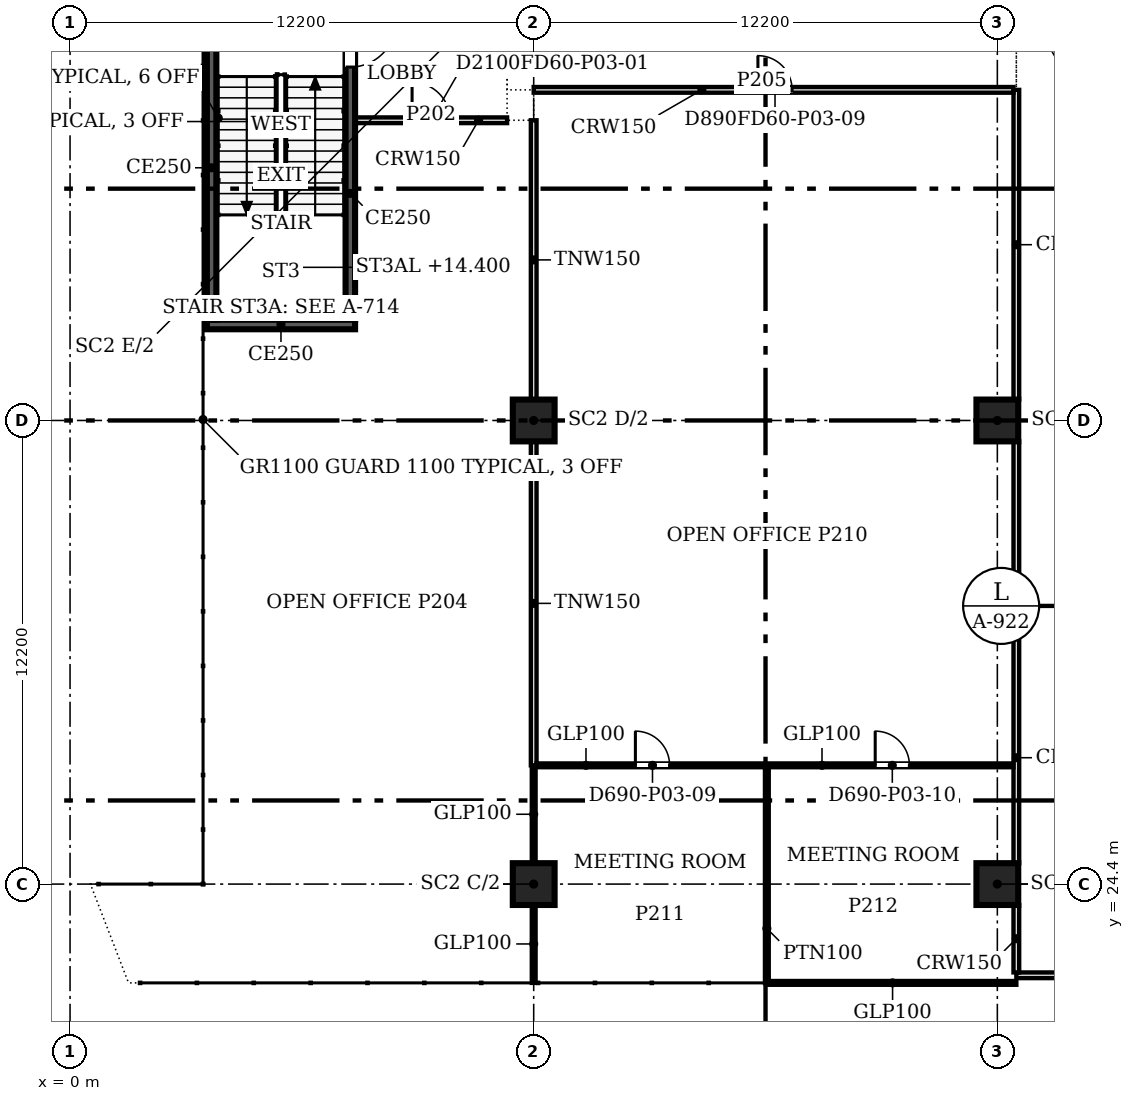
"""IFC4 building model, lengths in metres.
Left out: names, types, materials, properties, quantities, classifications, styles, units other than length and angle.
Written with IfcOpenShell. Run it as: python <this file> out.ifc"""

import sys

from ifc_helpers import new_model, si_unit, direction, frame, frame_2d, origin, origin_2d, place, context, subcontext, project, spatial, polyline, rectangle, outline, extrude, faceted_brep, source, transform, mapped, element, fill, save


model = new_model("IFC4")
c1 = context("Model", 3, precision=1e-05, world=origin(), true_north=direction((0.0, 1.0)))
c2 = subcontext(c1, "Body", "Model", "MODEL_VIEW")
j1 = project(units=[si_unit("LENGTHUNIT", "METRE"), si_unit("PLANEANGLEUNIT", "RADIAN")], contexts=[c1])
p1 = place(None, origin())
s1 = spatial("IfcSite", under=j1, at=p1, CompositionType="ELEMENT")
p2 = place(p1, origin())
s2 = spatial("IfcBuilding", under=s1, at=p2, CompositionType="ELEMENT")
p3 = place(p2, frame((0.0, 0.0, 12.0)))
s3 = spatial("IfcBuildingStorey", under=s2, at=p3, CompositionType="ELEMENT", Elevation=12.0)
for number, where, z_axis, x_axis in (
    (1, (12.2, 24.4, 0.0), (0.0, 0.0, 1.0), (1.0, 0.0, 0.0)),
    (2, (12.2, 36.6, 0.0), (0.0, 0.0, 1.0), (1.0, 0.0, 0.0)),
    (3, (24.4, 24.4, 0.0), (0.0, 0.0, 1.0), (1.0, 0.0, 0.0)),
    (4, (24.4, 36.6, 0.0), (0.0, 0.0, 1.0), (1.0, 0.0, 0.0)),
):
    element("IfcColumn", number, at=place(p3, frame(where, z_axis=z_axis, x_axis=x_axis)), inside=s3, PredefinedType="COLUMN", context=c2, shape_type="SweptSolid", body=[
        extrude(rectangle(XDim=1.1, YDim=1.1, at=origin_2d()), origin(), (0.0, 0.0, 1.0), 4.6),
    ])
m1 = source(origin(), c2, "Body", "Brep", [
    faceted_brep([(0.047, -0.25, 0.0), (6.1, -0.25, 8.4), (0.0, -0.25, 8.4), (0.0, -0.25, 0.066), (0.093, 0.25, 8.4), (6.1, 0.25, 8.4), (0.093, 0.25, 0.065), (0.047, 0.0, 0.0)], [[[0, 1, 2, 3]], [[4, 5, 6]], [[6, 5, 1, 0, 7]], [[5, 4, 2, 1]], [[7, 0, 3]], [[6, 7, 3, 2, 4]]]),
])
p4 = place(p3, frame((0.25, 48.8, -3.6), z_axis=(0.0, 0.0, 1.0), x_axis=(0.0, -1.0, 0.0)))
e5 = element("IfcWall", 5, at=p4, inside=s3, PredefinedType="SOLIDWALL", context=c2, shape_type="MappedRepresentation", body=[
    mapped(m1, transform((0.0, 0.0, 0.0), scale=1.0)),
])
m2 = source(origin(), c2, "Body", "SweptSolid", [
    extrude(outline(polyline([(0.247, 0.705), (5.612, 8.15), (0.247, 8.15), (0.247, 0.705)])), frame((0.0, 0.26, 0.0), z_axis=(0.0, -1.0, 0.0), x_axis=(1.0, 0.0, 0.0)), (0.0, 0.0, 1.0), 0.52),
])
p5 = place(p4, origin())
e6 = element("IfcOpeningElement", 6, at=p5, cuts=e5, PredefinedType="OPENING", context=c2, shape_type="MappedRepresentation", body=[
    mapped(m2, transform((0.0, 0.0, 0.0), scale=1.0)),
])
m3 = source(origin(), c2, "Body", "SweptSolid", [
    extrude(outline(polyline([(6.1, 0.0), (12.2, 8.4), (0.0, 8.4), (6.1, 0.0)])), frame((0.0, 0.25, 0.0), z_axis=(0.0, -1.0, 0.0), x_axis=(1.0, 0.0, 0.0)), (0.0, 0.0, 1.0), 0.5),
])
p6 = place(p3, frame((0.25, 42.7, -3.6), z_axis=(0.0, 0.0, 1.0), x_axis=(0.0, -1.0, 0.0)))
e7 = element("IfcWall", 7, at=p6, inside=s3, PredefinedType="SOLIDWALL", context=c2, shape_type="MappedRepresentation", body=[
    mapped(m3, transform((0.0, 0.0, 0.0), scale=1.0)),
])
m4 = source(origin(), c2, "Body", "SweptSolid", [
    extrude(outline(polyline([(6.1, 0.426), (11.709, 8.15), (0.49, 8.15), (6.1, 0.426)])), frame((0.0, 0.26, 0.0), z_axis=(0.0, -1.0, 0.0), x_axis=(1.0, 0.0, 0.0)), (0.0, 0.0, 1.0), 0.52),
])
p7 = place(p6, origin())
e8 = element("IfcOpeningElement", 8, at=p7, cuts=e7, PredefinedType="OPENING", context=c2, shape_type="MappedRepresentation", body=[
    mapped(m4, transform((0.0, 0.0, 0.0), scale=1.0)),
])
m5 = source(origin(), c2, "Body", "Brep", [
    faceted_brep([(6.053, -0.25, 0.0), (6.1, -0.25, 0.066), (6.1, -0.25, 8.4), (0.0, -0.25, 8.4), (0.0, 0.25, 8.4), (6.007, 0.25, 8.4), (6.007, 0.25, 0.065), (6.053, 0.0, 0.0)], [[[0, 1, 2, 3]], [[4, 5, 6]], [[1, 0, 7]], [[5, 4, 3, 2]], [[4, 6, 7, 0, 3]], [[1, 7, 6, 5, 2]]]),
])
p8 = place(p3, frame((0.25, 30.5, -3.6), z_axis=(0.0, 0.0, 1.0), x_axis=(0.0, -1.0, 0.0)))
e9 = element("IfcWall", 9, at=p8, inside=s3, PredefinedType="SOLIDWALL", context=c2, shape_type="MappedRepresentation", body=[
    mapped(m5, transform((0.0, 0.0, 0.0), scale=1.0)),
])
m6 = source(origin(), c2, "Body", "SweptSolid", [
    extrude(outline(polyline([(5.854, 8.15), (0.488, 8.15), (5.854, 0.705), (5.854, 8.15)])), frame((0.0, 0.26, 0.0), z_axis=(0.0, -1.0, 0.0), x_axis=(1.0, 0.0, 0.0)), (0.0, 0.0, 1.0), 0.52),
])
p9 = place(p8, origin())
e10 = element("IfcOpeningElement", 10, at=p9, cuts=e9, PredefinedType="OPENING", context=c2, shape_type="MappedRepresentation", body=[
    mapped(m6, transform((0.0, 0.0, 0.0), scale=1.0)),
])
m7 = source(origin(), c2, "Body", "Brep", [
    faceted_brep([(6.1, -0.25, 0.0), (0.0, -0.25, 8.4), (0.0, -0.25, 7.549), (5.482, -0.25, 0.0), (6.1, -0.25, 0.0), (5.482, 0.25, 0.0), (0.0, 0.25, 7.549), (0.0, 0.25, 8.4), (6.1, 0.25, 0.0), (6.1, 0.25, 0.0)], [[[0, 1, 2, 3, 4]], [[5, 6, 7, 8, 9]], [[8, 7, 1, 0]], [[7, 6, 2, 1]], [[6, 5, 3, 2]], [[5, 9, 4, 3]], [[4, 9, 8, 0]]]),
])
p10 = place(p3, frame((0.25, 42.7, -3.6), z_axis=(0.0, 0.0, 1.0), x_axis=(0.0, -1.0, 0.0)))
e11 = element("IfcWall", 11, at=p10, inside=s3, PredefinedType="SOLIDWALL", context=c2, shape_type="MappedRepresentation", body=[
    mapped(m7, transform((0.0, 0.0, 0.0), scale=1.0)),
])
m8 = source(origin(), c2, "Body", "Brep", [
    faceted_brep([(6.053, -0.25, 8.4), (0.0, -0.25, 0.0), (0.613, -0.25, 0.0), (6.053, -0.25, 7.549), (6.053, 0.25, 7.549), (0.613, 0.25, 0.0), (0.047, 0.25, 0.0), (0.047, 0.25, 0.065), (6.053, 0.25, 8.4), (0.0, 0.0, 0.0)], [[[0, 1, 2, 3]], [[4, 5, 6, 7, 8]], [[8, 7, 9, 1, 0]], [[6, 5, 2, 1, 9]], [[5, 4, 3, 2]], [[6, 9, 7]], [[3, 4, 8, 0]]]),
])
p11 = place(p3, frame((0.25, 48.753, -3.6), z_axis=(0.0, 0.0, 1.0), x_axis=(0.0, -1.0, 0.0)))
e12 = element("IfcWall", 12, at=p11, inside=s3, PredefinedType="SOLIDWALL", context=c2, shape_type="MappedRepresentation", body=[
    mapped(m8, transform((0.0, 0.0, 0.0), scale=1.0)),
])
m9 = source(origin(), c2, "Body", "Brep", [
    faceted_brep([(6.053, -0.25, 0.0), (0.0, -0.25, 8.4), (0.0, -0.25, 7.549), (5.44, -0.25, 0.0), (5.44, 0.25, 0.0), (0.0, 0.25, 7.549), (0.0, 0.25, 8.4), (6.007, 0.25, 0.065), (6.007, 0.25, 0.0), (6.053, 0.0, 0.0)], [[[0, 1, 2, 3]], [[4, 5, 6, 7, 8]], [[7, 6, 1, 0, 9]], [[6, 5, 2, 1]], [[5, 4, 3, 2]], [[4, 8, 9, 0, 3]], [[9, 8, 7]]]),
])
p12 = place(p3, frame((0.25, 30.5, -3.6), z_axis=(0.0, 0.0, 1.0), x_axis=(0.0, -1.0, 0.0)))
e13 = element("IfcWall", 13, at=p12, inside=s3, PredefinedType="SOLIDWALL", context=c2, shape_type="MappedRepresentation", body=[
    mapped(m9, transform((0.0, 0.0, 0.0), scale=1.0)),
])
m10 = source(origin(), c2, "Body", "SweptSolid", [
    extrude(outline(polyline([(6.1, 8.4), (0.0, 0.0), (0.618, 0.0), (6.1, 7.549), (6.1, 8.4)])), frame((0.0, 0.25, 0.0), z_axis=(0.0, -1.0, 0.0), x_axis=(1.0, 0.0, 0.0)), (0.0, 0.0, 1.0), 0.5),
])
p13 = place(p3, frame((0.25, 36.6, -3.6), z_axis=(0.0, 0.0, 1.0), x_axis=(0.0, -1.0, 0.0)))
e14 = element("IfcWall", 14, at=p13, inside=s3, PredefinedType="SOLIDWALL", context=c2, shape_type="MappedRepresentation", body=[
    mapped(m10, transform((0.0, 0.0, 0.0), scale=1.0)),
])
p14 = place(p3, frame((7.5, 39.125, 0.0), z_axis=(0.0, 0.0, 1.0), x_axis=(-1.0, 0.0, 0.0)))
e15 = element("IfcWall", 15, at=p14, inside=s3, PredefinedType="SOLIDWALL", context=c2, shape_type="SweptSolid", body=[
    extrude(rectangle(XDim=3.9, YDim=0.25, at=frame_2d((1.95, 0.0))), origin(), (0.0, 0.0, 1.0), 4.8),
])
p15 = place(p3, frame((3.725, 39.25, 0.0), z_axis=(0.0, 0.0, 1.0), x_axis=(0.0, 1.0, 0.0)))
e16 = element("IfcWall", 16, at=p15, inside=s3, PredefinedType="SOLIDWALL", context=c2, shape_type="SweptSolid", body=[
    extrude(rectangle(XDim=8.0, YDim=0.25, at=frame_2d((4.0, 0.0))), origin(), (0.0, 0.0, 1.0), 4.8),
])
p16 = place(p3, frame((7.375, 47.25, 0.0), z_axis=(0.0, 0.0, 1.0), x_axis=(0.0, -1.0, 0.0)))
e17 = element("IfcWall", 17, at=p16, inside=s3, PredefinedType="SOLIDWALL", context=c2, shape_type="SweptSolid", body=[
    extrude(rectangle(XDim=8.0, YDim=0.25, at=frame_2d((4.0, 0.0))), origin(), (0.0, 0.0, 1.0), 4.8),
])
m11 = source(origin(), c2, "Body", "SweptSolid", [
    extrude(rectangle(XDim=1.2, YDim=2.1, at=frame_2d((0.6, 1.05))), frame((0.0, 0.135, 0.0), z_axis=(0.0, -1.0, 0.0), x_axis=(1.0, 0.0, 0.0)), (0.0, 0.0, 1.0), 0.27),
])
p17 = place(p16, frame((0.15, 0.0, 0.0)))
e18 = element("IfcOpeningElement", 18, at=p17, cuts=e17, PredefinedType="OPENING", context=c2, shape_type="MappedRepresentation", body=[
    mapped(m11, transform((0.0, 0.0, 0.0), scale=1.0)),
])
p18 = place(p3, frame((12.2, 21.8, 0.0), z_axis=(0.0, 0.0, 1.0), x_axis=(0.0, 1.0, 0.0)))
e19 = element("IfcWall", 19, at=p18, inside=s3, PredefinedType="PARTITIONING", context=c2, shape_type="SweptSolid", body=[
    extrude(rectangle(XDim=2.049, YDim=0.1, at=frame_2d((1.024, 0.0))), origin(), (0.0, 0.0, 1.0), 3.672),
])
p19 = place(p3, frame((18.335, 21.8, 0.0), z_axis=(0.0, 0.0, 1.0), x_axis=(0.0, 1.0, 0.0)))
e20 = element("IfcWall", 20, at=p19, inside=s3, PredefinedType="PARTITIONING", context=c2, shape_type="SweptSolid", body=[
    extrude(rectangle(XDim=5.725, YDim=0.1, at=frame_2d((2.862, 0.0))), origin(), (0.0, 0.0, 1.0), 3.672),
])
p20 = place(p3, frame((18.386, 21.8, 0.0), z_axis=(0.0, 0.0, 1.0), x_axis=(1.0, 0.0, 0.0)))
e21 = element("IfcWall", 21, at=p20, inside=s3, PredefinedType="PARTITIONING", context=c2, shape_type="SweptSolid", body=[
    extrude(rectangle(XDim=6.514, YDim=0.1, at=frame_2d((3.257, 0.0))), origin(), (0.0, 0.0, 1.0), 3.672),
])
p21 = place(p3, frame((51.424, 22.0, 0.0), z_axis=(0.0, 0.0, 1.0), x_axis=(-1.0, 0.0, 0.0)))
e22 = element("IfcWall", 22, at=p21, inside=s3, PredefinedType="PARTITIONING", context=c2, shape_type="SweptSolid", body=[
    extrude(rectangle(XDim=26.524, YDim=0.15, at=frame_2d((13.262, 0.0))), origin(), (0.0, 0.0, 1.0), 3.672),
])
m12 = source(origin(), c2, "Body", "SweptSolid", [
    extrude(rectangle(XDim=1.8, YDim=2.1, at=frame_2d((0.9, 1.05))), frame((0.0, 0.085, 0.0), z_axis=(0.0, -1.0, 0.0), x_axis=(1.0, 0.0, 0.0)), (0.0, 0.0, 1.0), 0.17),
])
p22 = place(p21, frame((12.123, 0.0, 0.0)))
e23 = element("IfcOpeningElement", 23, at=p22, cuts=e22, PredefinedType="OPENING", context=c2, shape_type="MappedRepresentation", body=[
    mapped(m12, transform((0.0, 0.0, 0.0), scale=1.0)),
])
p23 = place(p21, frame((21.124, 0.0, 0.0)))
e24 = element("IfcOpeningElement", 24, at=p23, cuts=e22, PredefinedType="OPENING", context=c2, shape_type="MappedRepresentation", body=[
    mapped(m12, transform((0.0, 0.0, 0.0), scale=1.0)),
])
m13 = source(origin(), c2, "Body", "SweptSolid", [
    extrude(rectangle(XDim=0.9, YDim=2.1, at=frame_2d((0.45, 1.05))), frame((0.0, 0.085, 0.0), z_axis=(0.0, -1.0, 0.0), x_axis=(1.0, 0.0, 0.0)), (0.0, 0.0, 1.0), 0.17),
])
p24 = place(p21, frame((3.823, 0.0, 0.0)))
e25 = element("IfcOpeningElement", 25, at=p24, cuts=e22, PredefinedType="OPENING", context=c2, shape_type="MappedRepresentation", body=[
    mapped(m13, transform((0.0, 0.0, 0.0), scale=1.0)),
])
p25 = place(p3, frame((24.9, 22.076, 0.0), z_axis=(0.0, 0.0, 1.0), x_axis=(0.0, 1.0, 0.0)))
e26 = element("IfcWall", 26, at=p25, inside=s3, PredefinedType="PARTITIONING", context=c2, shape_type="SweptSolid", body=[
    extrude(rectangle(XDim=1.773, YDim=0.15, at=frame_2d((0.887, 0.0))), origin(), (0.0, 0.0, 1.0), 3.672),
])
p26 = place(p3, frame((12.2, 24.951, 0.0), z_axis=(0.0, 0.0, 1.0), x_axis=(0.0, 1.0, 0.0)))
e27 = element("IfcWall", 27, at=p26, inside=s3, PredefinedType="PARTITIONING", context=c2, shape_type="SweptSolid", body=[
    extrude(rectangle(XDim=2.573, YDim=0.1, at=frame_2d((1.287, 0.0))), origin(), (0.0, 0.0, 1.0), 3.672),
])
p27 = place(p3, frame((24.9, 24.951, 0.0), z_axis=(0.0, 0.0, 1.0), x_axis=(0.0, 1.0, 0.0)))
e28 = element("IfcWall", 28, at=p27, inside=s3, PredefinedType="PARTITIONING", context=c2, shape_type="SweptSolid", body=[
    extrude(rectangle(XDim=11.098, YDim=0.15, at=frame_2d((5.549, 0.0))), origin(), (0.0, 0.0, 1.0), 3.672),
])
p28 = place(p3, frame((12.2, 27.525, 0.0), z_axis=(0.0, 0.0, 1.0), x_axis=(0.0, 1.0, 0.0)))
e29 = element("IfcWall", 29, at=p28, inside=s3, PredefinedType="PARTITIONING", context=c2, shape_type="SweptSolid", body=[
    extrude(rectangle(XDim=8.524, YDim=0.15, at=frame_2d((4.262, 0.0))), origin(), (0.0, 0.0, 1.0), 3.672),
])
p29 = place(p3, frame((18.284, 27.525, 0.0), z_axis=(0.0, 0.0, 1.0), x_axis=(-1.0, 0.0, 0.0)))
e30 = element("IfcWall", 30, at=p29, inside=s3, PredefinedType="PARTITIONING", context=c2, shape_type="SweptSolid", body=[
    extrude(rectangle(XDim=6.008, YDim=0.1, at=frame_2d((3.004, 0.0))), origin(), (0.0, 0.0, 1.0), 3.672),
])
m14 = source(origin(), c2, "Body", "SweptSolid", [
    extrude(rectangle(XDim=0.9, YDim=2.1, at=frame_2d((0.45, 1.05))), frame((0.0, 0.06, 0.0), z_axis=(0.0, -1.0, 0.0), x_axis=(1.0, 0.0, 0.0)), (0.0, 0.0, 1.0), 0.12),
])
p30 = place(p29, frame((2.508, 0.0, 0.0)))
e31 = element("IfcOpeningElement", 31, at=p30, cuts=e30, PredefinedType="OPENING", context=c2, shape_type="MappedRepresentation", body=[
    mapped(m14, transform((0.0, 0.0, 0.0), scale=1.0)),
])
p31 = place(p3, frame((24.824, 27.525, 0.0), z_axis=(0.0, 0.0, 1.0), x_axis=(-1.0, 0.0, 0.0)))
e32 = element("IfcWall", 32, at=p31, inside=s3, PredefinedType="PARTITIONING", context=c2, shape_type="SweptSolid", body=[
    extrude(rectangle(XDim=6.438, YDim=0.1, at=frame_2d((3.219, 0.0))), origin(), (0.0, 0.0, 1.0), 3.672),
])
p32 = place(p31, frame((2.738, 0.0, 0.0)))
e33 = element("IfcOpeningElement", 33, at=p32, cuts=e32, PredefinedType="OPENING", context=c2, shape_type="MappedRepresentation", body=[
    mapped(m14, transform((0.0, 0.0, 0.0), scale=1.0)),
])
p33 = place(p3, frame((12.2, 37.151, 0.0), z_axis=(0.0, 0.0, 1.0), x_axis=(0.0, 1.0, 0.0)))
e34 = element("IfcWall", 34, at=p33, inside=s3, PredefinedType="PARTITIONING", context=c2, shape_type="SweptSolid", body=[
    extrude(rectangle(XDim=7.349, YDim=0.15, at=frame_2d((3.675, 0.0))), origin(), (0.0, 0.0, 1.0), 3.672),
])
p34 = place(p3, frame((24.9, 37.151, 0.0), z_axis=(0.0, 0.0, 1.0), x_axis=(0.0, 1.0, 0.0)))
e35 = element("IfcWall", 35, at=p34, inside=s3, PredefinedType="PARTITIONING", context=c2, shape_type="SweptSolid", body=[
    extrude(rectangle(XDim=8.149, YDim=0.15, at=frame_2d((4.075, 0.0))), origin(), (0.0, 0.0, 1.0), 3.672),
])
p35 = place(p3, frame((11.5, 44.5, 0.0), z_axis=(0.0, 0.0, 1.0), x_axis=(-1.0, 0.0, 0.0)))
e36 = element("IfcWall", 36, at=p35, inside=s3, PredefinedType="PARTITIONING", context=c2, shape_type="SweptSolid", body=[
    extrude(rectangle(XDim=4.0, YDim=0.15, at=frame_2d((2.0, 0.0))), origin(), (0.0, 0.0, 1.0), 3.672),
])
m15 = source(origin(), c2, "Body", "SweptSolid", [
    extrude(rectangle(XDim=1.0, YDim=2.1, at=frame_2d((0.5, 1.05))), frame((0.0, 0.085, 0.0), z_axis=(0.0, -1.0, 0.0), x_axis=(1.0, 0.0, 0.0)), (0.0, 0.0, 1.0), 0.17),
])
p36 = place(p35, frame((1.5, 0.0, 0.0)))
e37 = element("IfcOpeningElement", 37, at=p36, cuts=e36, PredefinedType="OPENING", context=c2, shape_type="MappedRepresentation", body=[
    mapped(m15, transform((0.0, 0.0, 0.0), scale=1.0)),
])
p37 = place(p3, frame((24.824, 45.3, 0.0), z_axis=(0.0, 0.0, 1.0), x_axis=(-1.0, 0.0, 0.0)))
e38 = element("IfcWall", 38, at=p37, inside=s3, PredefinedType="PARTITIONING", context=c2, shape_type="SweptSolid", body=[
    extrude(rectangle(XDim=12.624, YDim=0.15, at=frame_2d((6.312, 0.0))), origin(), (0.0, 0.0, 1.0), 3.672),
])
p38 = place(p37, frame((5.824, 0.0, 0.0)))
e39 = element("IfcOpeningElement", 39, at=p38, cuts=e38, PredefinedType="OPENING", context=c2, shape_type="MappedRepresentation", body=[
    mapped(m13, transform((0.0, 0.0, 0.0), scale=1.0)),
])
m16 = source(origin(), c2, "Body", "SweptSolid", [
    extrude(rectangle(XDim=1.2, YDim=2.1, at=frame_2d((0.6, 1.05))), frame((0.0, 0.025, 0.0), z_axis=(0.0, -1.0, 0.0), x_axis=(1.0, 0.0, 0.0)), (0.0, 0.0, 1.0), 0.05),
])
p39 = place(p17, origin())
e40 = element("IfcDoor", 40, at=p39, inside=s3, OperationType="SINGLE_SWING_LEFT", PredefinedType="DOOR", context=c2, shape_type="MappedRepresentation", body=[
    mapped(m16, transform((0.0, 0.0, 0.0), scale=1.0)),
])
fill(e18, e40)
m17 = source(origin(), c2, "Body", "SweptSolid", [
    extrude(rectangle(XDim=1.0, YDim=2.1, at=frame_2d((0.5, 1.05))), frame((0.0, 0.025, 0.0), z_axis=(0.0, -1.0, 0.0), x_axis=(1.0, 0.0, 0.0)), (0.0, 0.0, 1.0), 0.05),
])
p40 = place(p36, origin())
e41 = element("IfcDoor", 41, at=p40, inside=s3, OperationType="SINGLE_SWING_RIGHT", PredefinedType="DOOR", context=c2, shape_type="MappedRepresentation", body=[
    mapped(m17, transform((0.0, 0.0, 0.0), scale=1.0)),
])
fill(e37, e41)
m18 = source(origin(), c2, "Body", "SweptSolid", [
    extrude(rectangle(XDim=0.9, YDim=2.1, at=frame_2d((0.45, 1.05))), frame((0.0, 0.025, 0.0), z_axis=(0.0, -1.0, 0.0), x_axis=(1.0, 0.0, 0.0)), (0.0, 0.0, 1.0), 0.05),
])
p41 = place(p30, origin())
e42 = element("IfcDoor", 42, at=p41, inside=s3, OperationType="SINGLE_SWING_RIGHT", PredefinedType="DOOR", context=c2, shape_type="MappedRepresentation", body=[
    mapped(m18, transform((0.0, 0.0, 0.0), scale=1.0)),
])
fill(e31, e42)
p42 = place(p32, origin())
e43 = element("IfcDoor", 43, at=p42, inside=s3, OperationType="SINGLE_SWING_RIGHT", PredefinedType="DOOR", context=c2, shape_type="MappedRepresentation", body=[
    mapped(m18, transform((0.0, 0.0, 0.0), scale=1.0)),
])
fill(e33, e43)
p43 = place(p38, origin())
e44 = element("IfcDoor", 44, at=p43, inside=s3, OperationType="SINGLE_SWING_RIGHT", PredefinedType="DOOR", context=c2, shape_type="MappedRepresentation", body=[
    mapped(m18, transform((0.0, 0.0, 0.0), scale=1.0)),
])
fill(e39, e44)
save(model, sys.argv[1])
